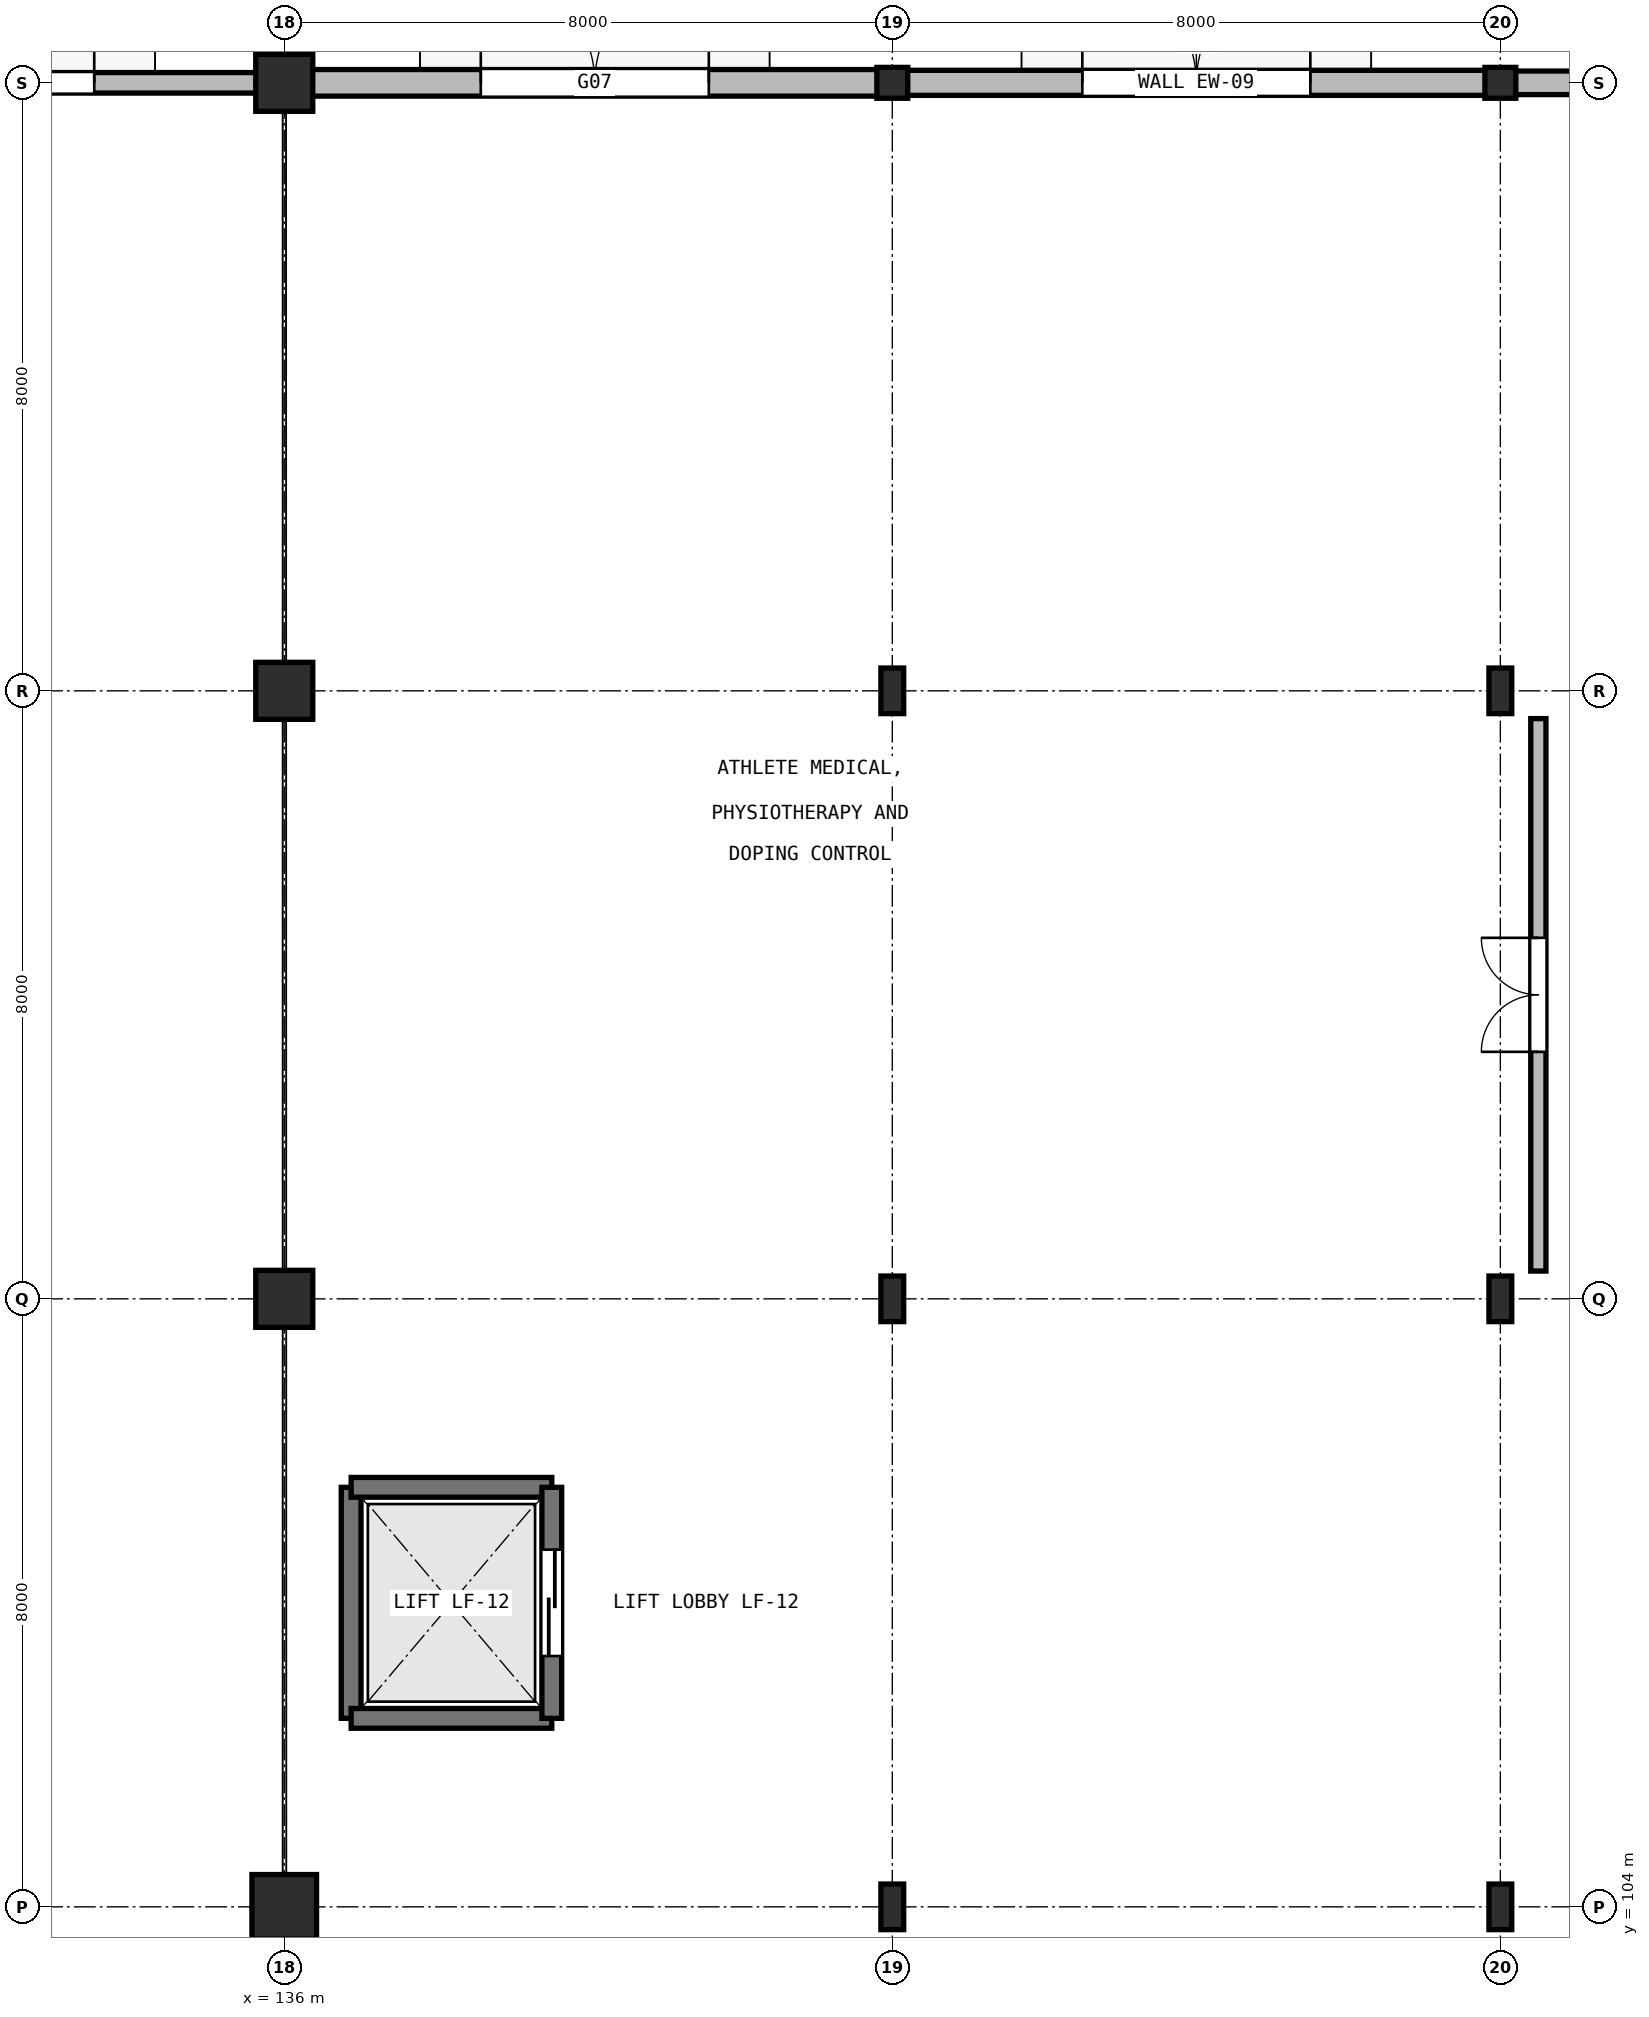
"""IFC4 building model, lengths in metres.
Left out: names, types, materials, properties, quantities, classifications, styles, units other than length and angle.
Written with IfcOpenShell. Run it as: python <this file> out.ifc"""

import sys

from ifc_helpers import new_model, si_unit, direction, frame, frame_2d, origin, origin_2d, place, context, subcontext, project, spatial, rectangle, hollow_circle, i_section, extrude, element, fill, save


model = new_model("IFC4")
c1 = context("Model", 3, precision=1e-05, world=origin(), true_north=direction((0.0, 1.0)))
c2 = subcontext(c1, "Body", "Model", "MODEL_VIEW")
j1 = project(units=[si_unit("LENGTHUNIT", "METRE"), si_unit("PLANEANGLEUNIT", "RADIAN")], contexts=[c1])
p1 = place(None, origin())
s1 = spatial("IfcSite", under=j1, at=p1, CompositionType="ELEMENT")
p2 = place(p1, origin())
s2 = spatial("IfcBuilding", under=s1, at=p2, CompositionType="ELEMENT")
p3 = place(p2, origin())
s3 = spatial("IfcBuildingStorey", under=s2, at=p3, CompositionType="ELEMENT", Elevation=0.0)
p4 = place(p3, frame((136.0, 104.0, 0.0), z_axis=(0.0, 0.0, 1.0), x_axis=(1.0, 0.0, 0.0)))
e1 = element("IfcColumn", 1, at=p4, inside=s3, PredefinedType="COLUMN", context=c2, shape_type="SweptSolid", body=[
    extrude(rectangle(XDim=0.85, YDim=0.85, at=origin_2d()), origin(), (0.0, 0.0, 1.0), 5.4),
])
for number, where, z_axis, x_axis in (
    (2, (136.0, 112.0, 0.0), (0.0, 0.0, 1.0), (1.0, 0.0, 0.0)),
    (3, (136.0, 120.0, 0.0), (0.0, 0.0, 1.0), (1.0, 0.0, 0.0)),
    (4, (136.0, 128.0, 0.0), (0.0, 0.0, 1.0), (1.0, 0.0, 0.0)),
):
    element("IfcColumn", number, at=place(p3, frame(where, z_axis=z_axis, x_axis=x_axis)), inside=s3, PredefinedType="COLUMN", context=c2, shape_type="SweptSolid", body=[
        extrude(rectangle(XDim=0.75, YDim=0.75, at=origin_2d()), origin(), (0.0, 0.0, 1.0), 5.4),
    ])
for number, where, z_axis, x_axis in (
    (5, (144.0, 104.0, 0.0), (0.0, 0.0, 1.0), (1.0, 0.0, 0.0)),
    (6, (144.0, 112.0, 0.0), (0.0, 0.0, 1.0), (1.0, 0.0, 0.0)),
    (7, (144.0, 120.0, 0.0), (0.0, 0.0, 1.0), (1.0, 0.0, 0.0)),
):
    element("IfcColumn", number, at=place(p3, frame(where, z_axis=z_axis, x_axis=x_axis)), inside=s3, PredefinedType="COLUMN", context=c2, shape_type="SweptSolid", body=[
        extrude(i_section(OverallWidth=0.3, OverallDepth=0.6, WebThickness=0.015, FlangeThickness=0.03, FilletRadius=0.027, at=origin_2d()), origin(), (0.0, 0.0, 1.0), 5.4),
    ])
p5 = place(p3, frame((144.0, 128.0, 0.0), z_axis=(0.0, 0.0, 1.0), x_axis=(1.0, 0.0, 0.0)))
e8 = element("IfcColumn", 8, at=p5, inside=s3, PredefinedType="COLUMN", context=c2, shape_type="SweptSolid", body=[
    extrude(hollow_circle(Radius=0.203, WallThickness=0.02, at=origin_2d()), origin(), (0.0, 0.0, 1.0), 5.4),
])
for number, where, z_axis, x_axis in (
    (9, (152.0, 104.0, 0.0), (0.0, 0.0, 1.0), (1.0, 0.0, 0.0)),
    (10, (152.0, 112.0, 0.0), (0.0, 0.0, 1.0), (1.0, 0.0, 0.0)),
    (11, (152.0, 120.0, 0.0), (0.0, 0.0, 1.0), (1.0, 0.0, 0.0)),
):
    element("IfcColumn", number, at=place(p3, frame(where, z_axis=z_axis, x_axis=x_axis)), inside=s3, PredefinedType="COLUMN", context=c2, shape_type="SweptSolid", body=[
        extrude(i_section(OverallWidth=0.3, OverallDepth=0.6, WebThickness=0.015, FlangeThickness=0.03, FilletRadius=0.027, at=origin_2d()), origin(), (0.0, 0.0, 1.0), 5.4),
    ])
p6 = place(p3, frame((152.0, 128.0, 0.0), z_axis=(0.0, 0.0, 1.0), x_axis=(1.0, 0.0, 0.0)))
e12 = element("IfcColumn", 12, at=p6, inside=s3, PredefinedType="COLUMN", context=c2, shape_type="SweptSolid", body=[
    extrude(hollow_circle(Radius=0.203, WallThickness=0.02, at=origin_2d()), origin(), (0.0, 0.0, 1.0), 5.4),
])
p7 = place(p3, frame((152.183, 128.0, 0.0), z_axis=(0.0, 0.0, 1.0), x_axis=(1.0, 0.0, 0.0)))
e13 = element("IfcWall", 13, at=p7, inside=s3, PredefinedType="SOLIDWALL", context=c2, shape_type="SweptSolid", body=[
    extrude(rectangle(XDim=7.634, YDim=0.31, at=frame_2d((3.817, 0.0))), origin(), (0.0, 0.0, 1.0), 4.51),
])
p8 = place(p7, frame((2.317, 0.0, 0.0)))
e14 = element("IfcOpeningElement", 14, at=p8, cuts=e13, PredefinedType="OPENING", context=c2, shape_type="SweptSolid", body=[
    extrude(rectangle(XDim=3.0, YDim=2.4, at=frame_2d((1.5, 1.2))), frame((0.0, 0.165, 0.0), z_axis=(0.0, -1.0, 0.0), x_axis=(1.0, 0.0, 0.0)), (0.0, 0.0, 1.0), 0.33),
])
p9 = place(p3, frame((144.183, 128.0, 0.0), z_axis=(0.0, 0.0, 1.0), x_axis=(1.0, 0.0, 0.0)))
e15 = element("IfcWall", 15, at=p9, inside=s3, PredefinedType="SOLIDWALL", context=c2, shape_type="SweptSolid", body=[
    extrude(rectangle(XDim=7.634, YDim=0.33, at=frame_2d((3.817, 0.0))), origin(), (0.0, 0.0, 1.0), 4.51),
])
p10 = place(p9, frame((2.317, 0.0, 0.0)))
e16 = element("IfcOpeningElement", 16, at=p10, cuts=e15, PredefinedType="OPENING", context=c2, shape_type="SweptSolid", body=[
    extrude(rectangle(XDim=3.0, YDim=2.4, at=frame_2d((1.5, 1.2))), frame((0.0, 0.175, 0.0), z_axis=(0.0, -1.0, 0.0), x_axis=(1.0, 0.0, 0.0)), (0.0, 0.0, 1.0), 0.35),
])
p11 = place(p3, frame((136.355, 128.0, 0.0), z_axis=(0.0, 0.0, 1.0), x_axis=(1.0, 0.0, 0.0)))
e17 = element("IfcWall", 17, at=p11, inside=s3, PredefinedType="SOLIDWALL", context=c2, shape_type="SweptSolid", body=[
    extrude(rectangle(XDim=7.462, YDim=0.35, at=frame_2d((3.731, 0.0))), origin(), (0.0, 0.0, 1.0), 4.51),
])
p12 = place(p11, frame((2.231, 0.0, 0.0)))
e18 = element("IfcOpeningElement", 18, at=p12, cuts=e17, PredefinedType="OPENING", context=c2, shape_type="SweptSolid", body=[
    extrude(rectangle(XDim=3.0, YDim=2.4, at=frame_2d((1.5, 1.2))), frame((0.0, 0.185, 0.0), z_axis=(0.0, -1.0, 0.0), x_axis=(1.0, 0.0, 0.0)), (0.0, 0.0, 1.0), 0.37),
])
p13 = place(p3, frame((128.355, 128.0, 0.0), z_axis=(0.0, 0.0, 1.0), x_axis=(1.0, 0.0, 0.0)))
e19 = element("IfcWall", 19, at=p13, inside=s3, PredefinedType="SOLIDWALL", context=c2, shape_type="SweptSolid", body=[
    extrude(rectangle(XDim=7.29, YDim=0.27, at=frame_2d((3.645, 0.0))), origin(), (0.0, 0.0, 1.0), 4.51),
])
p14 = place(p13, frame((2.145, 0.0, 0.0)))
e20 = element("IfcOpeningElement", 20, at=p14, cuts=e19, PredefinedType="OPENING", context=c2, shape_type="SweptSolid", body=[
    extrude(rectangle(XDim=3.0, YDim=2.4, at=frame_2d((1.5, 1.2))), frame((0.0, 0.145, 0.0), z_axis=(0.0, -1.0, 0.0), x_axis=(1.0, 0.0, 0.0)), (0.0, 0.0, 1.0), 0.29),
])
p15 = place(p3, frame((136.88, 106.48, 0.0), z_axis=(0.0, 0.0, 1.0), x_axis=(0.0, 1.0, 0.0)))
e21 = element("IfcWall", 21, at=p15, inside=s3, PredefinedType="SHEAR", context=c2, shape_type="SweptSolid", body=[
    extrude(rectangle(XDim=3.04, YDim=0.26, at=frame_2d((1.52, 0.0))), origin(), (0.0, 0.0, 1.0), 5.08),
])
for number, where, z_axis, x_axis in (
    (22, (136.88, 109.52, 0.0), (0.0, 0.0, 1.0), (1.0, 0.0, 0.0)),
    (23, (139.52, 106.48, 0.0), (0.0, 0.0, 1.0), (-1.0, 0.0, 0.0)),
):
    element("IfcWall", number, at=place(p3, frame(where, z_axis=z_axis, x_axis=x_axis)), inside=s3, PredefinedType="SHEAR", context=c2, shape_type="SweptSolid", body=[
        extrude(rectangle(XDim=2.64, YDim=0.26, at=frame_2d((1.32, 0.0))), origin(), (0.0, 0.0, 1.0), 5.08),
    ])
p16 = place(p3, frame((139.52, 109.52, 0.0), z_axis=(0.0, 0.0, 1.0), x_axis=(0.0, -1.0, 0.0)))
e24 = element("IfcWall", 24, at=p16, inside=s3, PredefinedType="SHEAR", context=c2, shape_type="SweptSolid", body=[
    extrude(rectangle(XDim=3.04, YDim=0.26, at=frame_2d((1.52, 0.0))), origin(), (0.0, 0.0, 1.0), 5.08),
])
p17 = place(p16, frame((0.82, 0.0, 0.0)))
e25 = element("IfcOpeningElement", 25, at=p17, cuts=e24, PredefinedType="OPENING", context=c2, shape_type="SweptSolid", body=[
    extrude(rectangle(XDim=1.4, YDim=2.2, at=frame_2d((0.7, 1.1))), frame((0.0, 0.14, 0.0), z_axis=(0.0, -1.0, 0.0), x_axis=(1.0, 0.0, 0.0)), (0.0, 0.0, 1.0), 0.28),
])
p18 = place(p3, frame((152.5, 112.365, 0.0), z_axis=(0.0, 0.0, 1.0), x_axis=(0.0, 1.0, 0.0)))
e26 = element("IfcWall", 26, at=p18, inside=s3, PredefinedType="PARTITIONING", context=c2, shape_type="SweptSolid", body=[
    extrude(rectangle(XDim=7.269, YDim=0.2, at=frame_2d((3.635, 0.0))), origin(), (0.0, 0.0, 1.0), 4.5),
])
p19 = place(p18, frame((2.885, 0.0, 0.0)))
e27 = element("IfcOpeningElement", 27, at=p19, cuts=e26, PredefinedType="OPENING", context=c2, shape_type="SweptSolid", body=[
    extrude(rectangle(XDim=1.5, YDim=2.2, at=frame_2d((0.75, 1.1))), frame((0.0, 0.11, 0.0), z_axis=(0.0, -1.0, 0.0), x_axis=(1.0, 0.0, 0.0)), (0.0, 0.0, 1.0), 0.22),
])
p20 = place(p10, origin())
e28 = element("IfcDoor", 28, at=p20, inside=s3, OperationType="DOUBLE_DOOR_SINGLE_SWING", PredefinedType="DOOR", context=c2, shape_type="SweptSolid", body=[
    extrude(rectangle(XDim=3.0, YDim=2.4, at=frame_2d((1.5, 1.2))), frame((0.0, 0.025, 0.0), z_axis=(0.0, -1.0, 0.0), x_axis=(1.0, 0.0, 0.0)), (0.0, 0.0, 1.0), 0.05),
])
fill(e16, e28)
p21 = place(p12, origin())
e29 = element("IfcDoor", 29, at=p21, inside=s3, OperationType="DOUBLE_DOOR_SINGLE_SWING", PredefinedType="DOOR", context=c2, shape_type="SweptSolid", body=[
    extrude(rectangle(XDim=3.0, YDim=2.4, at=frame_2d((1.5, 1.2))), frame((0.0, 0.025, 0.0), z_axis=(0.0, -1.0, 0.0), x_axis=(1.0, 0.0, 0.0)), (0.0, 0.0, 1.0), 0.05),
])
fill(e18, e29)
p22 = place(p14, origin())
e30 = element("IfcDoor", 30, at=p22, inside=s3, OperationType="DOUBLE_DOOR_SINGLE_SWING", PredefinedType="DOOR", context=c2, shape_type="SweptSolid", body=[
    extrude(rectangle(XDim=3.0, YDim=2.4, at=frame_2d((1.5, 1.2))), frame((0.0, 0.025, 0.0), z_axis=(0.0, -1.0, 0.0), x_axis=(1.0, 0.0, 0.0)), (0.0, 0.0, 1.0), 0.05),
])
fill(e20, e30)
p23 = place(p17, origin())
e31 = element("IfcDoor", 31, at=p23, inside=s3, OperationType="SLIDING_TO_LEFT", PredefinedType="DOOR", context=c2, shape_type="SweptSolid", body=[
    extrude(rectangle(XDim=1.4, YDim=2.2, at=frame_2d((0.7, 1.1))), frame((0.0, 0.025, 0.0), z_axis=(0.0, -1.0, 0.0), x_axis=(1.0, 0.0, 0.0)), (0.0, 0.0, 1.0), 0.05),
])
fill(e25, e31)
p24 = place(p19, origin())
e32 = element("IfcDoor", 32, at=p24, inside=s3, OperationType="DOUBLE_DOOR_SINGLE_SWING", PredefinedType="DOOR", context=c2, shape_type="SweptSolid", body=[
    extrude(rectangle(XDim=1.5, YDim=2.2, at=frame_2d((0.75, 1.1))), frame((0.0, 0.025, 0.0), z_axis=(0.0, -1.0, 0.0), x_axis=(1.0, 0.0, 0.0)), (0.0, 0.0, 1.0), 0.05),
])
fill(e27, e32)
save(model, sys.argv[1])
